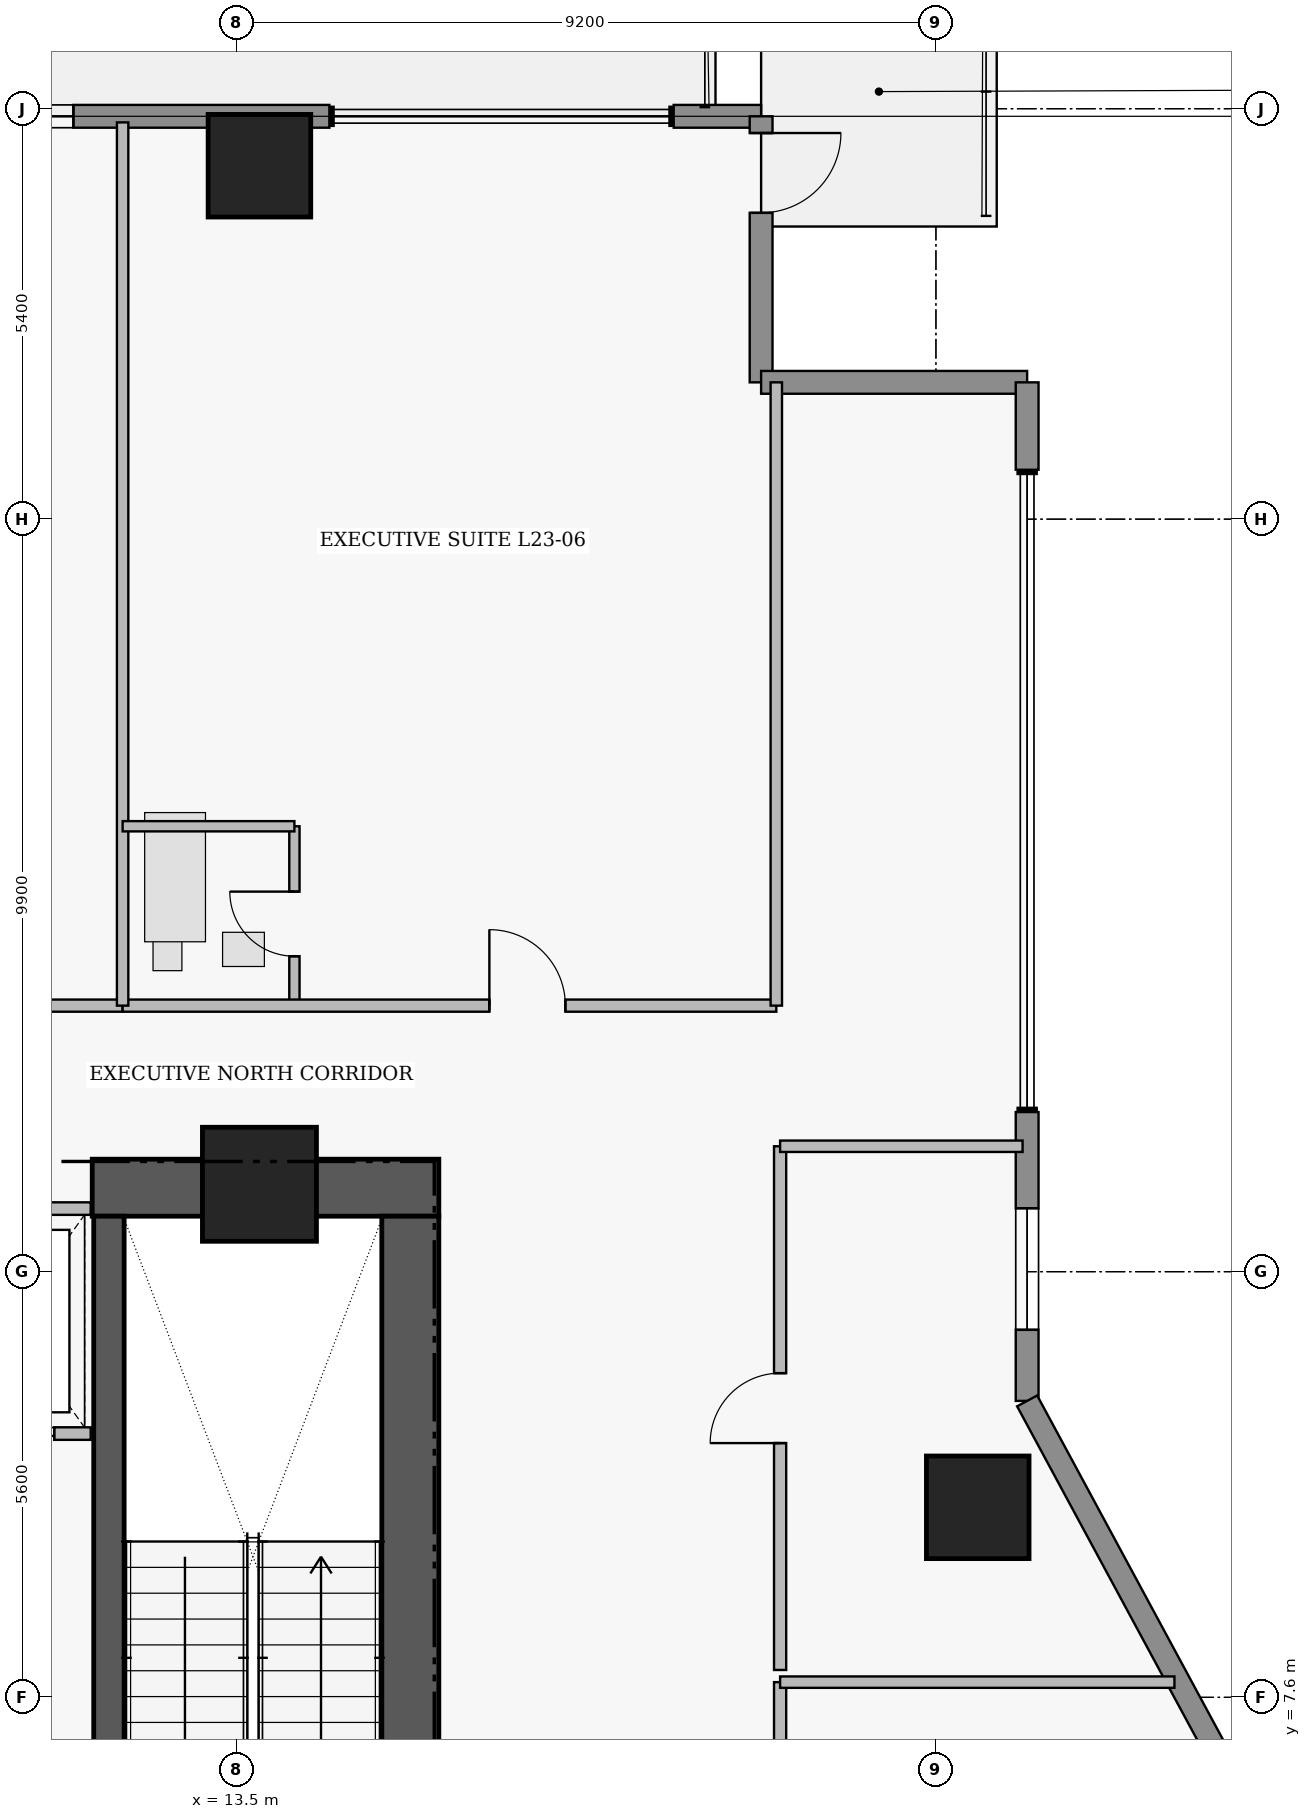
"""IFC4 building model, lengths in metres.
Left out: names, types, materials, properties, quantities, classifications, styles, units other than length and angle.
Written with IfcOpenShell. Run it as: python <this file> out.ifc"""

import sys

from ifc_helpers import new_model, si_unit, direction, frame, frame_2d, origin, origin_2d, place, context, subcontext, project, spatial, rectangle, extrude, element, fill, save


model = new_model("IFC4")
c1 = context("Model", 3, precision=1e-05, world=origin(), true_north=direction((0.0, 1.0)))
c2 = subcontext(c1, "Body", "Model", "MODEL_VIEW")
j1 = project(units=[si_unit("LENGTHUNIT", "METRE"), si_unit("PLANEANGLEUNIT", "RADIAN")], contexts=[c1])
p1 = place(None, origin())
s1 = spatial("IfcSite", under=j1, at=p1, CompositionType="ELEMENT")
p2 = place(p1, origin())
s2 = spatial("IfcBuilding", under=s1, at=p2, CompositionType="ELEMENT")
p3 = place(p2, frame((0.0, 0.0, 95.65)))
s3 = spatial("IfcBuildingStorey", under=s2, at=p3, CompositionType="ELEMENT", Elevation=95.65)
p4 = place(p3, frame((11.6, 14.305, 0.0), z_axis=(0.0, 0.0, 1.0), x_axis=(1.0, 0.0, 0.0)))
e1 = element("IfcWall", 1, at=p4, inside=s3, PredefinedType="SHEAR", context=c2, shape_type="SweptSolid", body=[
    extrude(rectangle(XDim=4.56, YDim=0.75, at=frame_2d((2.28, 0.0))), origin(), (0.0, 0.0, 1.0), 3.46),
])
p5 = place(p3, frame((15.785, 4.97, 0.0), z_axis=(0.0, 0.0, 1.0), x_axis=(0.0, 1.0, 0.0)))
e2 = element("IfcWall", 2, at=p5, inside=s3, PredefinedType="SHEAR", context=c2, shape_type="SweptSolid", body=[
    extrude(rectangle(XDim=8.96, YDim=0.75, at=frame_2d((4.48, 0.0))), origin(), (0.0, 0.0, 1.0), 3.46),
])
p6 = place(p3, frame((11.82, 13.93, 0.0), z_axis=(0.0, 0.0, 1.0), x_axis=(0.0, -1.0, 0.0)))
e3 = element("IfcWall", 3, at=p6, inside=s3, PredefinedType="SHEAR", context=c2, shape_type="SweptSolid", body=[
    extrude(rectangle(XDim=8.96, YDim=0.4, at=frame_2d((4.48, 0.0))), origin(), (0.0, 0.0, 1.0), 3.46),
])
p7 = place(p6, frame((7.53, 0.0, 0.0)))
e4 = element("IfcOpeningElement", 4, at=p7, cuts=e3, PredefinedType="OPENING", context=c2, shape_type="SweptSolid", body=[
    extrude(rectangle(XDim=1.12, YDim=2.22, at=frame_2d((0.56, 1.11))), frame((0.0, 0.21, 0.0), z_axis=(0.0, -1.0, 0.0), x_axis=(1.0, 0.0, 0.0)), (0.0, 0.0, 1.0), 0.42),
])
p8 = place(p3, frame((13.8, 14.35, 0.0), z_axis=(0.0, 0.0, 1.0), x_axis=(1.0, 0.0, 0.0)))
e5 = element("IfcColumn", 5, at=p8, inside=s3, PredefinedType="COLUMN", context=c2, shape_type="SweptSolid", body=[
    extrude(rectangle(XDim=1.5, YDim=1.5, at=origin_2d()), origin(), (0.0, 0.0, 1.0), 3.65),
])
for number, where, z_axis, x_axis in (
    (6, (13.8, 27.75, 0.43), (0.0, 0.0, 1.0), (1.0, 0.0, 0.0)),
    (7, (23.25, 10.1, 0.43), (0.0, 0.0, 1.0), (1.0, 0.0, 0.0)),
):
    element("IfcColumn", number, at=place(p3, frame(where, z_axis=z_axis, x_axis=x_axis)), inside=s3, PredefinedType="COLUMN", context=c2, shape_type="SweptSolid", body=[
        extrude(rectangle(XDim=1.35, YDim=1.35, at=origin_2d()), origin(), (0.0, 0.0, 1.0), 3.22),
    ])
p9 = place(p3, frame((3.68, 28.4, 0.0), z_axis=(0.0, 0.0, 1.0), x_axis=(1.0, 0.0, 0.0)))
e8 = element("IfcWall", 8, at=p9, inside=s3, PredefinedType="STANDARD", context=c2, shape_type="SweptSolid", body=[
    extrude(rectangle(XDim=11.04, YDim=0.3, at=frame_2d((5.52, 0.0))), origin(), (0.0, 0.0, 1.0), 3.43),
])
p10 = place(p9, frame((4.695, 0.0, 0.0)))
e9 = element("IfcOpeningElement", 9, at=p10, cuts=e8, PredefinedType="OPENING", context=c2, shape_type="SweptSolid", body=[
    extrude(rectangle(XDim=1.05, YDim=2.2, at=frame_2d((0.525, 1.1))), frame((0.0, 0.16, 0.0), z_axis=(0.0, -1.0, 0.0), x_axis=(1.0, 0.0, 0.0)), (0.0, 0.0, 1.0), 0.32),
])
p11 = place(p9, frame((2.768, 0.0, 0.95)))
e10 = element("IfcOpeningElement", 10, at=p11, cuts=e8, PredefinedType="OPENING", context=c2, shape_type="SweptSolid", body=[
    extrude(rectangle(XDim=1.15, YDim=1.55, at=frame_2d((0.575, 0.775))), frame((0.0, 0.16, 0.0), z_axis=(0.0, -1.0, 0.0), x_axis=(1.0, 0.0, 0.0)), (0.0, 0.0, 1.0), 0.32),
])
p12 = place(p9, frame((6.522, 0.0, 0.95)))
e11 = element("IfcOpeningElement", 11, at=p12, cuts=e8, PredefinedType="OPENING", context=c2, shape_type="SweptSolid", body=[
    extrude(rectangle(XDim=1.15, YDim=1.55, at=frame_2d((0.575, 0.775))), frame((0.0, 0.16, 0.0), z_axis=(0.0, -1.0, 0.0), x_axis=(1.0, 0.0, 0.0)), (0.0, 0.0, 1.0), 0.32),
])
p13 = place(p3, frame((19.25, 28.4, 0.0), z_axis=(0.0, 0.0, 1.0), x_axis=(1.0, 0.0, 0.0)))
e12 = element("IfcWall", 12, at=p13, inside=s3, PredefinedType="STANDARD", context=c2, shape_type="SweptSolid", body=[
    extrude(rectangle(XDim=1.15, YDim=0.3, at=frame_2d((0.575, 0.0))), origin(), (0.0, 0.0, 1.0), 3.43),
])
p14 = place(p3, frame((20.4, 28.4, 0.0), z_axis=(0.0, 0.0, 1.0), x_axis=(0.0, -1.0, 0.0)))
e13 = element("IfcWall", 13, at=p14, inside=s3, PredefinedType="STANDARD", context=c2, shape_type="SweptSolid", body=[
    extrude(rectangle(XDim=3.5, YDim=0.3, at=frame_2d((1.75, 0.0))), origin(), (0.0, 0.0, 1.0), 3.43),
])
p15 = place(p14, frame((0.22, 0.0, 0.0)))
e14 = element("IfcOpeningElement", 14, at=p15, cuts=e13, PredefinedType="OPENING", context=c2, shape_type="SweptSolid", body=[
    extrude(rectangle(XDim=1.05, YDim=2.2, at=frame_2d((0.525, 1.1))), frame((0.0, 0.16, 0.0), z_axis=(0.0, -1.0, 0.0), x_axis=(1.0, 0.0, 0.0)), (0.0, 0.0, 1.0), 0.32),
])
p16 = place(p3, frame((20.4, 24.9, 0.0), z_axis=(0.0, 0.0, 1.0), x_axis=(1.0, 0.0, 0.0)))
e15 = element("IfcWall", 15, at=p16, inside=s3, PredefinedType="STANDARD", context=c2, shape_type="SweptSolid", body=[
    extrude(rectangle(XDim=3.5, YDim=0.3, at=frame_2d((1.75, 0.0))), origin(), (0.0, 0.0, 1.0), 3.43),
])
p17 = place(p3, frame((23.9, 24.9, 0.0), z_axis=(0.0, 0.0, 1.0), x_axis=(0.0, -1.0, 0.0)))
e16 = element("IfcWall", 16, at=p17, inside=s3, PredefinedType="STANDARD", context=c2, shape_type="SweptSolid", body=[
    extrude(rectangle(XDim=1.15, YDim=0.3, at=frame_2d((0.575, 0.0))), origin(), (0.0, 0.0, 1.0), 3.43),
])
p18 = place(p3, frame((23.9, 15.3, 0.0), z_axis=(0.0, 0.0, 1.0), x_axis=(0.0, -1.0, 0.0)))
e17 = element("IfcWall", 17, at=p18, inside=s3, PredefinedType="STANDARD", context=c2, shape_type="SweptSolid", body=[
    extrude(rectangle(XDim=3.8, YDim=0.3, at=frame_2d((1.9, 0.0))), origin(), (0.0, 0.0, 1.0), 3.43),
])
p19 = place(p18, frame((1.265, 0.0, 0.85)))
e18 = element("IfcOpeningElement", 18, at=p19, cuts=e17, PredefinedType="OPENING", context=c2, shape_type="SweptSolid", body=[
    extrude(rectangle(XDim=1.6, YDim=1.8, at=frame_2d((0.8, 0.9))), frame((0.0, 0.16, 0.0), z_axis=(0.0, -1.0, 0.0), x_axis=(1.0, 0.0, 0.0)), (0.0, 0.0, 1.0), 0.32),
])
p20 = place(p3, frame((23.9, 11.5, 0.0), z_axis=(0.0, 0.0, 1.0), x_axis=(0.475175525499, -0.879891027325, 0.0)))
e19 = element("IfcWall", 19, at=p20, inside=s3, PredefinedType="STANDARD", context=c2, shape_type="SweptSolid", body=[
    extrude(rectangle(XDim=5.683, YDim=0.3, at=frame_2d((2.841, 0.0))), origin(), (0.0, 0.0, 1.0), 3.43),
])
p21 = place(p3, frame((9.42, 11.07, 0.0), z_axis=(0.0, 0.0, 1.0), x_axis=(1.0, 0.0, 0.0)))
e20 = element("IfcWall", 20, at=p21, inside=s3, PredefinedType="PARTITIONING", context=c2, shape_type="SweptSolid", body=[
    extrude(rectangle(XDim=2.16, YDim=0.165, at=frame_2d((1.08, 0.0))), origin(), (0.0, 0.0, 1.0), 3.43),
])
p22 = place(p21, frame((0.53, 0.0, 0.0)))
e21 = element("IfcOpeningElement", 21, at=p22, cuts=e20, PredefinedType="OPENING", context=c2, shape_type="SweptSolid", body=[
    extrude(rectangle(XDim=1.15, YDim=2.25, at=frame_2d((0.575, 1.125))), frame((0.0, 0.093, 0.0), z_axis=(0.0, -1.0, 0.0), x_axis=(1.0, 0.0, 0.0)), (0.0, 0.0, 1.0), 0.185),
])
p23 = place(p3, frame((5.8, 16.7, 0.0), z_axis=(0.0, 0.0, 1.0), x_axis=(1.0, 0.0, 0.0)))
e22 = element("IfcWall", 22, at=p23, inside=s3, PredefinedType="PARTITIONING", context=c2, shape_type="SweptSolid", body=[
    extrude(rectangle(XDim=6.2, YDim=0.16, at=frame_2d((3.1, 0.0))), origin(), (0.0, 0.0, 1.0), 2.973),
])
p24 = place(p23, frame((3.75, 0.0, 0.0)))
e23 = element("IfcOpeningElement", 23, at=p24, cuts=e22, PredefinedType="OPENING", context=c2, shape_type="SweptSolid", body=[
    extrude(rectangle(XDim=1.0, YDim=2.15, at=frame_2d((0.5, 1.075))), frame((0.0, 0.09, 0.0), z_axis=(0.0, -1.0, 0.0), x_axis=(1.0, 0.0, 0.0)), (0.0, 0.0, 1.0), 0.18),
])
p25 = place(p3, frame((14.26, 16.7, 0.0), z_axis=(0.0, 0.0, 1.0), x_axis=(0.0, 1.0, 0.0)))
e24 = element("IfcWall", 24, at=p25, inside=s3, PredefinedType="PLUMBINGWALL", context=c2, shape_type="SweptSolid", body=[
    extrude(rectangle(XDim=2.36, YDim=0.135, at=frame_2d((1.18, 0.0))), origin(), (0.0, 0.0, 1.0), 2.503),
])
p26 = place(p25, frame((0.65, 0.0, 0.0)))
e25 = element("IfcOpeningElement", 25, at=p26, cuts=e24, PredefinedType="OPENING", context=c2, shape_type="SweptSolid", body=[
    extrude(rectangle(XDim=0.85, YDim=2.1, at=frame_2d((0.425, 1.05))), frame((0.0, 0.077, 0.0), z_axis=(0.0, -1.0, 0.0), x_axis=(1.0, 0.0, 0.0)), (0.0, 0.0, 1.0), 0.155),
])
p27 = place(p3, frame((12.0, 16.7, 0.0), z_axis=(0.0, 0.0, 1.0), x_axis=(1.0, 0.0, 0.0)))
e26 = element("IfcWall", 26, at=p27, inside=s3, PredefinedType="PARTITIONING", context=c2, shape_type="SweptSolid", body=[
    extrude(rectangle(XDim=8.6, YDim=0.16, at=frame_2d((4.3, 0.0))), origin(), (0.0, 0.0, 1.0), 2.973),
])
p28 = place(p27, frame((4.825, 0.0, 0.0)))
e27 = element("IfcOpeningElement", 27, at=p28, cuts=e26, PredefinedType="OPENING", context=c2, shape_type="SweptSolid", body=[
    extrude(rectangle(XDim=1.0, YDim=2.15, at=frame_2d((0.5, 1.075))), frame((0.0, 0.09, 0.0), z_axis=(0.0, -1.0, 0.0), x_axis=(1.0, 0.0, 0.0)), (0.0, 0.0, 1.0), 0.18),
])
p29 = place(p3, frame((20.65, 1.55, 0.0), z_axis=(0.0, 0.0, 1.0), x_axis=(0.0, 1.0, 0.0)))
e28 = element("IfcWall", 28, at=p29, inside=s3, PredefinedType="PARTITIONING", context=c2, shape_type="SweptSolid", body=[
    extrude(rectangle(XDim=6.25, YDim=0.16, at=frame_2d((3.125, 0.0))), origin(), (0.0, 0.0, 1.0), 3.43),
])
p30 = place(p29, frame((2.665, 0.0, 0.0)))
e29 = element("IfcOpeningElement", 29, at=p30, cuts=e28, PredefinedType="OPENING", context=c2, shape_type="SweptSolid", body=[
    extrude(rectangle(XDim=0.92, YDim=2.12, at=frame_2d((0.46, 1.06))), frame((0.0, 0.09, 0.0), z_axis=(0.0, -1.0, 0.0), x_axis=(1.0, 0.0, 0.0)), (0.0, 0.0, 1.0), 0.18),
])
p31 = place(p3, frame((20.65, 7.96, 0.0), z_axis=(0.0, 0.0, 1.0), x_axis=(0.0, 1.0, 0.0)))
e30 = element("IfcWall", 30, at=p31, inside=s3, PredefinedType="PARTITIONING", context=c2, shape_type="SweptSolid", body=[
    extrude(rectangle(XDim=6.89, YDim=0.16, at=frame_2d((3.445, 0.0))), origin(), (0.0, 0.0, 1.0), 3.43),
])
p32 = place(p31, frame((2.985, 0.0, 0.0)))
e31 = element("IfcOpeningElement", 31, at=p32, cuts=e30, PredefinedType="OPENING", context=c2, shape_type="SweptSolid", body=[
    extrude(rectangle(XDim=0.92, YDim=2.12, at=frame_2d((0.46, 1.06))), frame((0.0, 0.09, 0.0), z_axis=(0.0, -1.0, 0.0), x_axis=(1.0, 0.0, 0.0)), (0.0, 0.0, 1.0), 0.18),
])
p33 = place(p3, frame((9.42, 14.03, 0.0), z_axis=(0.0, 0.0, 1.0), x_axis=(1.0, 0.0, 0.0)))
e32 = element("IfcWall", 32, at=p33, inside=s3, PredefinedType="PARTITIONING", context=c2, shape_type="SweptSolid", body=[
    extrude(rectangle(XDim=2.16, YDim=0.165, at=frame_2d((1.08, 0.0))), origin(), (0.0, 0.0, 1.0), 3.43),
])
p34 = place(p3, frame((12.0, 16.7, 0.0), z_axis=(0.0, 0.0, 1.0), x_axis=(0.0, 1.0, 0.0)))
e33 = element("IfcWall", 33, at=p34, inside=s3, PredefinedType="PARTITIONING", context=c2, shape_type="SweptSolid", body=[
    extrude(rectangle(XDim=11.62, YDim=0.15, at=frame_2d((5.81, 0.0))), origin(), (0.0, 0.0, 1.0), 3.43),
])
p35 = place(p3, frame((12.0, 19.06, 0.0), z_axis=(0.0, 0.0, 1.0), x_axis=(1.0, 0.0, 0.0)))
e34 = element("IfcWall", 34, at=p35, inside=s3, PredefinedType="PLUMBINGWALL", context=c2, shape_type="SweptSolid", body=[
    extrude(rectangle(XDim=2.26, YDim=0.135, at=frame_2d((1.13, 0.0))), origin(), (0.0, 0.0, 1.0), 2.973),
])
p36 = place(p3, frame((20.6, 16.7, 0.0), z_axis=(0.0, 0.0, 1.0), x_axis=(0.0, 1.0, 0.0)))
e35 = element("IfcWall", 35, at=p36, inside=s3, PredefinedType="PARTITIONING", context=c2, shape_type="SweptSolid", body=[
    extrude(rectangle(XDim=8.2, YDim=0.15, at=frame_2d((4.1, 0.0))), origin(), (0.0, 0.0, 1.0), 3.43),
])
p37 = place(p3, frame((20.65, 7.8, 0.0), z_axis=(0.0, 0.0, 1.0), x_axis=(1.0, 0.0, 0.0)))
e36 = element("IfcWall", 36, at=p37, inside=s3, PredefinedType="PARTITIONING", context=c2, shape_type="SweptSolid", body=[
    extrude(rectangle(XDim=5.188, YDim=0.15, at=frame_2d((2.594, 0.0))), origin(), (0.0, 0.0, 1.0), 3.43),
])
p38 = place(p3, frame((20.65, 14.85, 0.0), z_axis=(0.0, 0.0, 1.0), x_axis=(1.0, 0.0, 0.0)))
e37 = element("IfcWall", 37, at=p38, inside=s3, PredefinedType="PARTITIONING", context=c2, shape_type="SweptSolid", body=[
    extrude(rectangle(XDim=3.19, YDim=0.15, at=frame_2d((1.595, 0.0))), origin(), (0.0, 0.0, 1.0), 3.43),
])
p39 = place(p12, origin())
e38 = element("IfcWindow", 38, at=p39, inside=s3, PartitioningType="SINGLE_PANEL", PredefinedType="WINDOW", context=c2, shape_type="SweptSolid", body=[
    extrude(rectangle(XDim=1.15, YDim=1.55, at=frame_2d((0.575, 0.775))), frame((0.0, 0.03, 0.0), z_axis=(0.0, -1.0, 0.0), x_axis=(1.0, 0.0, 0.0)), (0.0, 0.0, 1.0), 0.06),
])
fill(e11, e38)
p40 = place(p15, origin())
e39 = element("IfcDoor", 39, at=p40, inside=s3, OperationType="SINGLE_SWING_LEFT", PredefinedType="DOOR", context=c2, shape_type="SweptSolid", body=[
    extrude(rectangle(XDim=1.05, YDim=2.2, at=frame_2d((0.525, 1.1))), frame((0.0, 0.025, 0.0), z_axis=(0.0, -1.0, 0.0), x_axis=(1.0, 0.0, 0.0)), (0.0, 0.0, 1.0), 0.05),
])
fill(e14, e39)
p41 = place(p19, origin())
e40 = element("IfcWindow", 40, at=p41, inside=s3, PartitioningType="SINGLE_PANEL", PredefinedType="WINDOW", context=c2, shape_type="SweptSolid", body=[
    extrude(rectangle(XDim=1.6, YDim=1.8, at=frame_2d((0.8, 0.9))), frame((0.0, 0.03, 0.0), z_axis=(0.0, -1.0, 0.0), x_axis=(1.0, 0.0, 0.0)), (0.0, 0.0, 1.0), 0.06),
])
fill(e18, e40)
p42 = place(p22, origin())
e41 = element("IfcDoor", 41, at=p42, inside=s3, OperationType="SLIDING_TO_LEFT", PredefinedType="DOOR", context=c2, shape_type="SweptSolid", body=[
    extrude(rectangle(XDim=1.15, YDim=2.25, at=frame_2d((0.575, 1.125))), frame((0.0, 0.025, 0.0), z_axis=(0.0, -1.0, 0.0), x_axis=(1.0, 0.0, 0.0)), (0.0, 0.0, 1.0), 0.05),
])
fill(e21, e41)
p43 = place(p26, origin())
e42 = element("IfcDoor", 42, at=p43, inside=s3, OperationType="SINGLE_SWING_RIGHT", PredefinedType="DOOR", context=c2, shape_type="SweptSolid", body=[
    extrude(rectangle(XDim=0.85, YDim=2.1, at=frame_2d((0.425, 1.05))), frame((0.0, 0.025, 0.0), z_axis=(0.0, -1.0, 0.0), x_axis=(1.0, 0.0, 0.0)), (0.0, 0.0, 1.0), 0.05),
])
fill(e25, e42)
p44 = place(p28, origin())
e43 = element("IfcDoor", 43, at=p44, inside=s3, OperationType="SINGLE_SWING_LEFT", PredefinedType="DOOR", context=c2, shape_type="SweptSolid", body=[
    extrude(rectangle(XDim=1.0, YDim=2.15, at=frame_2d((0.5, 1.075))), frame((0.0, 0.025, 0.0), z_axis=(0.0, -1.0, 0.0), x_axis=(1.0, 0.0, 0.0)), (0.0, 0.0, 1.0), 0.05),
])
fill(e27, e43)
p45 = place(p32, origin())
e44 = element("IfcDoor", 44, at=p45, inside=s3, OperationType="SINGLE_SWING_LEFT", PredefinedType="DOOR", context=c2, shape_type="SweptSolid", body=[
    extrude(rectangle(XDim=0.92, YDim=2.12, at=frame_2d((0.46, 1.06))), frame((0.0, 0.025, 0.0), z_axis=(0.0, -1.0, 0.0), x_axis=(1.0, 0.0, 0.0)), (0.0, 0.0, 1.0), 0.05),
])
fill(e31, e44)
save(model, sys.argv[1])
